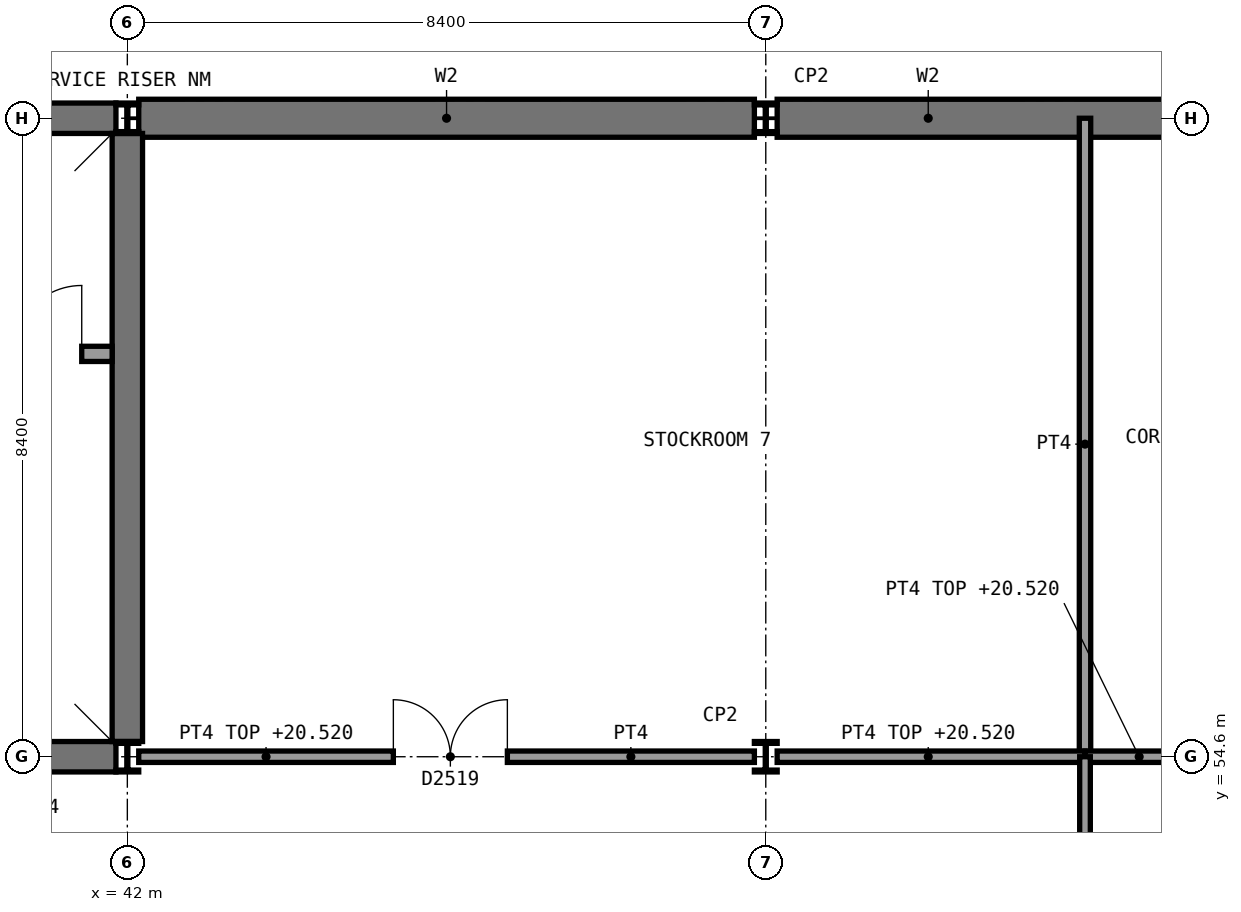
"""IFC4 building model, lengths in metres.
Left out: names, types, materials, properties, quantities, classifications, styles, units other than length and angle.
Written with IfcOpenShell. Run it as: python <this file> out.ifc"""

import sys

from ifc_helpers import new_model, si_unit, direction, frame, frame_2d, origin, origin_2d, place, context, subcontext, project, spatial, rectangle, i_section, extrude, element, fill, save


model = new_model("IFC4")
c1 = context("Model", 3, precision=1e-05, world=origin(), true_north=direction((0.0, 1.0)))
c2 = subcontext(c1, "Body", "Model", "MODEL_VIEW")
j1 = project(units=[si_unit("LENGTHUNIT", "METRE"), si_unit("PLANEANGLEUNIT", "RADIAN")], contexts=[c1])
p1 = place(None, origin())
s1 = spatial("IfcSite", under=j1, at=p1, CompositionType="ELEMENT")
p2 = place(p1, origin())
s2 = spatial("IfcBuilding", under=s1, at=p2, CompositionType="ELEMENT")
p3 = place(p2, frame((0.0, 0.0, 16.2)))
s3 = spatial("IfcBuildingStorey", under=s2, at=p3, CompositionType="ELEMENT", Elevation=16.2)
p4 = place(p3, frame((42.15, 63.0, 0.0), z_axis=(0.0, 0.0, 1.0), x_axis=(1.0, 0.0, 0.0)))
e1 = element("IfcWall", 1, at=p4, inside=s3, PredefinedType="SHEAR", context=c2, shape_type="SweptSolid", body=[
    extrude(rectangle(XDim=8.1, YDim=0.5, at=frame_2d((4.05, 0.0))), origin(), (0.0, 0.0, 1.0), 4.65),
])
p5 = place(p3, frame((50.55, 63.0, 0.0), z_axis=(0.0, 0.0, 1.0), x_axis=(1.0, 0.0, 0.0)))
e2 = element("IfcWall", 2, at=p5, inside=s3, PredefinedType="SHEAR", context=c2, shape_type="SweptSolid", body=[
    extrude(rectangle(XDim=8.1, YDim=0.5, at=frame_2d((4.05, 0.0))), origin(), (0.0, 0.0, 1.0), 4.65),
])
p6 = place(p3, frame((33.75, 63.0, 0.0), z_axis=(0.0, 0.0, 1.0), x_axis=(1.0, 0.0, 0.0)))
e3 = element("IfcWall", 3, at=p6, inside=s3, PredefinedType="SHEAR", context=c2, shape_type="SweptSolid", body=[
    extrude(rectangle(XDim=8.1, YDim=0.4, at=frame_2d((4.05, 0.0))), origin(), (0.0, 0.0, 1.0), 4.65),
])
p7 = place(p3, frame((33.75, 54.6, 0.0), z_axis=(0.0, 0.0, 1.0), x_axis=(1.0, 0.0, 0.0)))
e4 = element("IfcWall", 4, at=p7, inside=s3, PredefinedType="SHEAR", context=c2, shape_type="SweptSolid", body=[
    extrude(rectangle(XDim=8.1, YDim=0.4, at=frame_2d((4.05, 0.0))), origin(), (0.0, 0.0, 1.0), 4.65),
])
p8 = place(p7, frame((1.15, 0.0, 0.0)))
e5 = element("IfcOpeningElement", 5, at=p8, cuts=e4, PredefinedType="OPENING", context=c2, shape_type="SweptSolid", body=[
    extrude(rectangle(XDim=1.8, YDim=2.1, at=frame_2d((0.9, 1.05))), frame((0.0, 0.21, 0.0), z_axis=(0.0, -1.0, 0.0), x_axis=(1.0, 0.0, 0.0)), (0.0, 0.0, 1.0), 0.42),
])
p9 = place(p7, frame((5.3, 0.0, 0.0)))
e6 = element("IfcOpeningElement", 6, at=p9, cuts=e4, PredefinedType="OPENING", context=c2, shape_type="SweptSolid", body=[
    extrude(rectangle(XDim=1.8, YDim=2.1, at=frame_2d((0.9, 1.05))), frame((0.0, 0.21, 0.0), z_axis=(0.0, -1.0, 0.0), x_axis=(1.0, 0.0, 0.0)), (0.0, 0.0, 1.0), 0.42),
])
p10 = place(p3, frame((42.0, 54.8, 0.0), z_axis=(0.0, 0.0, 1.0), x_axis=(0.0, 1.0, 0.0)))
e7 = element("IfcWall", 7, at=p10, inside=s3, PredefinedType="SHEAR", context=c2, shape_type="SweptSolid", body=[
    extrude(rectangle(XDim=8.0, YDim=0.4, at=frame_2d((4.0, 0.0))), origin(), (0.0, 0.0, 1.0), 4.65),
])
for number, where, z_axis, x_axis in (
    (8, (42.0, 54.6, 0.0), (0.0, 0.0, 1.0), (1.0, 0.0, 0.0)),
    (9, (42.0, 63.0, 0.0), (0.0, 0.0, 1.0), (1.0, 0.0, 0.0)),
    (10, (50.4, 54.6, 0.0), (0.0, 0.0, 1.0), (1.0, 0.0, 0.0)),
    (11, (50.4, 63.0, 0.0), (0.0, 0.0, 1.0), (1.0, 0.0, 0.0)),
):
    element("IfcColumn", number, at=place(p3, frame(where, z_axis=z_axis, x_axis=x_axis)), inside=s3, PredefinedType="COLUMN", context=c2, shape_type="SweptSolid", body=[
        extrude(i_section(OverallWidth=0.3, OverallDepth=0.4, WebThickness=0.013, FlangeThickness=0.024, FilletRadius=0.027, at=origin_2d()), origin(), (0.0, 0.0, 1.0), 4.8),
    ])
p11 = place(p3, frame((54.6, 54.6, 0.0), z_axis=(0.0, 0.0, 1.0), x_axis=(0.0, 1.0, 0.0)))
e12 = element("IfcWall", 12, at=p11, inside=s3, PredefinedType="SOLIDWALL", context=c2, shape_type="SweptSolid", body=[
    extrude(rectangle(XDim=8.4, YDim=0.15, at=frame_2d((4.2, 0.0))), origin(), (0.0, 0.0, 1.0), 4.65),
])
p12 = place(p3, frame((42.15, 54.6, 0.0), z_axis=(0.0, 0.0, 1.0), x_axis=(1.0, 0.0, 0.0)))
e13 = element("IfcWall", 13, at=p12, inside=s3, PredefinedType="SOLIDWALL", context=c2, shape_type="SweptSolid", body=[
    extrude(rectangle(XDim=8.1, YDim=0.15, at=frame_2d((4.05, 0.0))), origin(), (0.0, 0.0, 1.0), 4.32),
])
p13 = place(p12, frame((3.35, 0.0, 0.0)))
e14 = element("IfcOpeningElement", 14, at=p13, cuts=e13, PredefinedType="OPENING", context=c2, shape_type="SweptSolid", body=[
    extrude(rectangle(XDim=1.5, YDim=2.1, at=frame_2d((0.75, 1.05))), frame((0.0, 0.085, 0.0), z_axis=(0.0, -1.0, 0.0), x_axis=(1.0, 0.0, 0.0)), (0.0, 0.0, 1.0), 0.17),
])
p14 = place(p3, frame((50.55, 54.6, 0.0), z_axis=(0.0, 0.0, 1.0), x_axis=(1.0, 0.0, 0.0)))
e15 = element("IfcWall", 15, at=p14, inside=s3, PredefinedType="SOLIDWALL", context=c2, shape_type="SweptSolid", body=[
    extrude(rectangle(XDim=4.05, YDim=0.15, at=frame_2d((2.025, 0.0))), origin(), (0.0, 0.0, 1.0), 4.32),
])
p15 = place(p3, frame((54.6, 54.6, 0.0), z_axis=(0.0, 0.0, 1.0), x_axis=(1.0, 0.0, 0.0)))
e16 = element("IfcWall", 16, at=p15, inside=s3, PredefinedType="SOLIDWALL", context=c2, shape_type="SweptSolid", body=[
    extrude(rectangle(XDim=4.05, YDim=0.15, at=frame_2d((2.025, 0.0))), origin(), (0.0, 0.0, 1.0), 4.32),
])
p16 = place(p15, frame((1.35, 0.0, 0.0)))
e17 = element("IfcOpeningElement", 17, at=p16, cuts=e16, PredefinedType="OPENING", context=c2, shape_type="SweptSolid", body=[
    extrude(rectangle(XDim=1.5, YDim=2.1, at=frame_2d((0.75, 1.05))), frame((0.0, 0.085, 0.0), z_axis=(0.0, -1.0, 0.0), x_axis=(1.0, 0.0, 0.0)), (0.0, 0.0, 1.0), 0.17),
])
p17 = place(p3, frame((54.6, 47.2, 0.0), z_axis=(0.0, 0.0, 1.0), x_axis=(0.0, 1.0, 0.0)))
e18 = element("IfcWall", 18, at=p17, inside=s3, PredefinedType="PARTITIONING", context=c2, shape_type="SweptSolid", body=[
    extrude(rectangle(XDim=7.4, YDim=0.14, at=frame_2d((3.7, 0.0))), origin(), (0.0, 0.0, 1.0), 4.65),
])
p18 = place(p3, frame((40.05, 59.9, 0.0), z_axis=(0.0, 0.0, 1.0), x_axis=(1.0, 0.0, 0.0)))
e19 = element("IfcWall", 19, at=p18, inside=s3, PredefinedType="PARTITIONING", context=c2, shape_type="SweptSolid", body=[
    extrude(rectangle(XDim=1.75, YDim=0.2, at=frame_2d((0.875, 0.0))), origin(), (0.0, 0.0, 1.0), 4.65),
])
p19 = place(p18, frame((0.45, 0.0, 0.0)))
e20 = element("IfcOpeningElement", 20, at=p19, cuts=e19, PredefinedType="OPENING", context=c2, shape_type="SweptSolid", body=[
    extrude(rectangle(XDim=0.9, YDim=2.1, at=frame_2d((0.45, 1.05))), frame((0.0, 0.11, 0.0), z_axis=(0.0, -1.0, 0.0), x_axis=(1.0, 0.0, 0.0)), (0.0, 0.0, 1.0), 0.22),
])
p20 = place(p13, origin())
e21 = element("IfcDoor", 21, at=p20, inside=s3, OperationType="DOUBLE_DOOR_SINGLE_SWING", PredefinedType="DOOR", context=c2, shape_type="SweptSolid", body=[
    extrude(rectangle(XDim=1.5, YDim=2.1, at=frame_2d((0.75, 1.05))), frame((0.0, 0.025, 0.0), z_axis=(0.0, -1.0, 0.0), x_axis=(1.0, 0.0, 0.0)), (0.0, 0.0, 1.0), 0.05),
])
fill(e14, e21)
p21 = place(p19, origin())
e22 = element("IfcDoor", 22, at=p21, inside=s3, OperationType="SINGLE_SWING_RIGHT", PredefinedType="DOOR", context=c2, shape_type="SweptSolid", body=[
    extrude(rectangle(XDim=0.9, YDim=2.1, at=frame_2d((0.45, 1.05))), frame((0.0, 0.025, 0.0), z_axis=(0.0, -1.0, 0.0), x_axis=(1.0, 0.0, 0.0)), (0.0, 0.0, 1.0), 0.05),
])
fill(e20, e22)
save(model, sys.argv[1])
